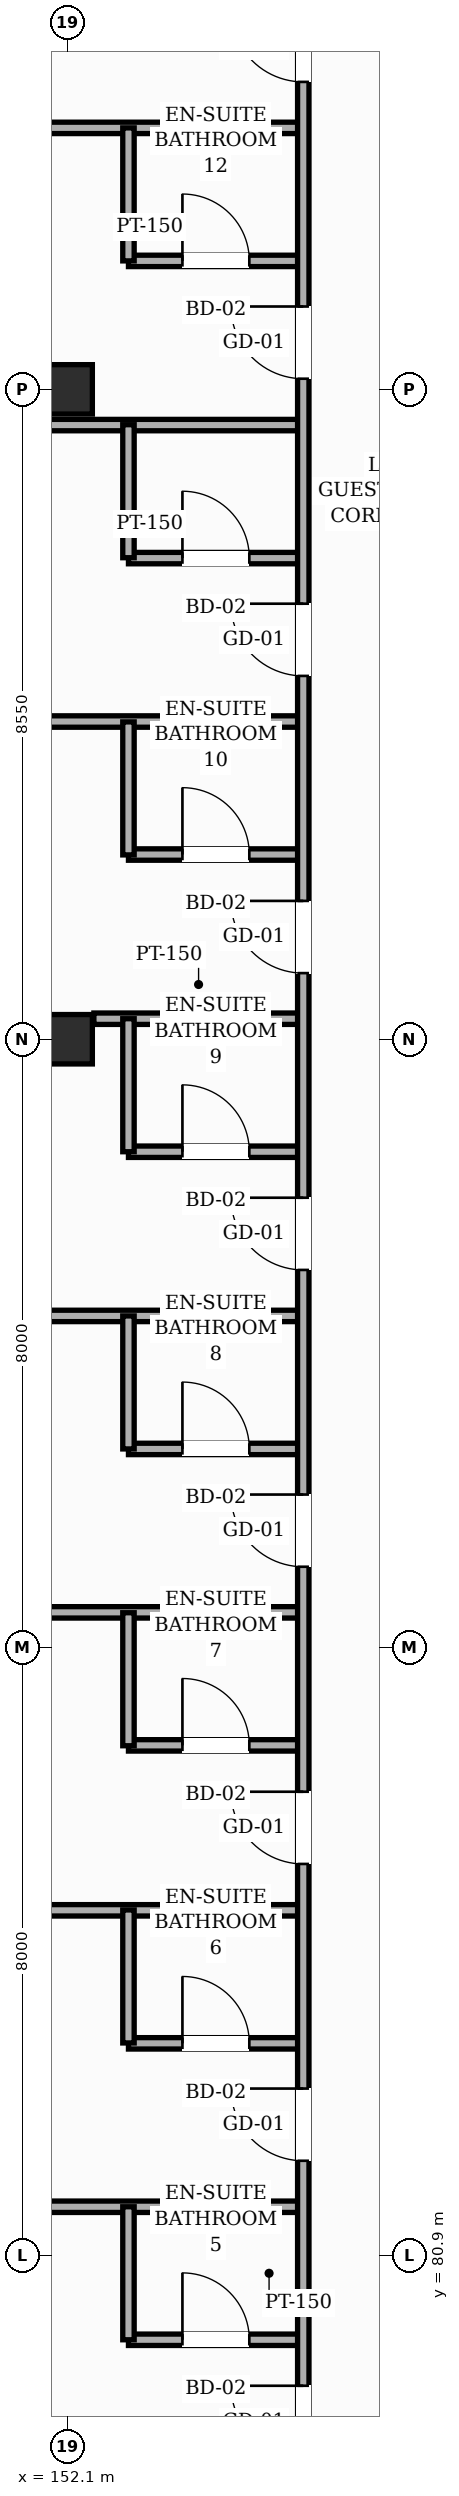
"""IFC4 building model, lengths in metres.
Left out: names, types, materials, properties, quantities, classifications, styles, units other than length and angle.
Written with IfcOpenShell. Run it as: python <this file> out.ifc"""

import sys

from ifc_helpers import new_model, si_unit, direction, frame, frame_2d, origin, origin_2d, place, context, subcontext, project, spatial, rectangle, hollow_rectangle, extrude, element, fill, save


model = new_model("IFC4")
c1 = context("Model", 3, precision=1e-05, world=origin(), true_north=direction((0.0, 1.0)))
c2 = subcontext(c1, "Body", "Model", "MODEL_VIEW")
j1 = project(units=[si_unit("LENGTHUNIT", "METRE"), si_unit("PLANEANGLEUNIT", "RADIAN")], contexts=[c1])
p1 = place(None, origin())
s1 = spatial("IfcSite", under=j1, at=p1, CompositionType="ELEMENT")
p2 = place(p1, origin())
s2 = spatial("IfcBuilding", under=s1, at=p2, CompositionType="ELEMENT")
p3 = place(p2, frame((0.0, 0.0, 15.0)))
s3 = spatial("IfcBuildingStorey", under=s2, at=p3, CompositionType="ELEMENT", Elevation=15.0)
for number, where, z_axis, x_axis in (
    (1, (152.1, 96.9, 0.0), (0.0, 0.0, 1.0), (1.0, 0.0, 0.0)),
    (2, (152.1, 105.45, 0.0), (0.0, 0.0, 1.0), (1.0, 0.0, 0.0)),
):
    element("IfcColumn", number, at=place(p3, frame(where, z_axis=z_axis, x_axis=x_axis)), inside=s3, PredefinedType="COLUMN", context=c2, shape_type="SweptSolid", body=[
        extrude(hollow_rectangle(XDim=0.65, YDim=0.65, WallThickness=0.025, InnerFilletRadius=0.025, OuterFilletRadius=0.05, at=origin_2d()), origin(), (0.0, 0.0, 1.0), 4.8),
    ])
p4 = place(p3, frame((152.9, 79.79, 0.0), z_axis=(0.0, 0.0, 1.0), x_axis=(1.0, 0.0, 0.0)))
e3 = element("IfcWall", 3, at=p4, inside=s3, PredefinedType="PARTITIONING", context=c2, shape_type="SweptSolid", body=[
    extrude(rectangle(XDim=2.3, YDim=0.15, at=frame_2d((1.15, 0.0))), origin(), (0.0, 0.0, 1.0), 4.545),
])
p5 = place(p4, frame((0.71, 0.0, 0.0)))
e4 = element("IfcOpeningElement", 4, at=p5, cuts=e3, PredefinedType="OPENING", context=c2, shape_type="SweptSolid", body=[
    extrude(rectangle(XDim=0.88, YDim=2.12, at=frame_2d((0.44, 1.06))), frame((0.0, 0.085, 0.0), z_axis=(0.0, -1.0, 0.0), x_axis=(1.0, 0.0, 0.0)), (0.0, 0.0, 1.0), 0.17),
])
p6 = place(p3, frame((144.2, 81.54, 0.0), z_axis=(0.0, 0.0, 1.0), x_axis=(1.0, 0.0, 0.0)))
e5 = element("IfcWall", 5, at=p6, inside=s3, PredefinedType="PARTITIONING", context=c2, shape_type="SweptSolid", body=[
    extrude(rectangle(XDim=11.0, YDim=0.15, at=frame_2d((5.5, 0.0))), origin(), (0.0, 0.0, 1.0), 4.545),
])
p7 = place(p3, frame((152.9, 83.69, 0.0), z_axis=(0.0, 0.0, 1.0), x_axis=(1.0, 0.0, 0.0)))
e6 = element("IfcWall", 6, at=p7, inside=s3, PredefinedType="PARTITIONING", context=c2, shape_type="SweptSolid", body=[
    extrude(rectangle(XDim=2.3, YDim=0.15, at=frame_2d((1.15, 0.0))), origin(), (0.0, 0.0, 1.0), 4.545),
])
p8 = place(p7, frame((0.71, 0.0, 0.0)))
e7 = element("IfcOpeningElement", 7, at=p8, cuts=e6, PredefinedType="OPENING", context=c2, shape_type="SweptSolid", body=[
    extrude(rectangle(XDim=0.88, YDim=2.12, at=frame_2d((0.44, 1.06))), frame((0.0, 0.085, 0.0), z_axis=(0.0, -1.0, 0.0), x_axis=(1.0, 0.0, 0.0)), (0.0, 0.0, 1.0), 0.17),
])
p9 = place(p3, frame((144.2, 85.44, 0.0), z_axis=(0.0, 0.0, 1.0), x_axis=(1.0, 0.0, 0.0)))
e8 = element("IfcWall", 8, at=p9, inside=s3, PredefinedType="PARTITIONING", context=c2, shape_type="SweptSolid", body=[
    extrude(rectangle(XDim=11.0, YDim=0.15, at=frame_2d((5.5, 0.0))), origin(), (0.0, 0.0, 1.0), 4.545),
])
p10 = place(p3, frame((152.9, 87.61, 0.0), z_axis=(0.0, 0.0, 1.0), x_axis=(1.0, 0.0, 0.0)))
e9 = element("IfcWall", 9, at=p10, inside=s3, PredefinedType="PARTITIONING", context=c2, shape_type="SweptSolid", body=[
    extrude(rectangle(XDim=2.3, YDim=0.15, at=frame_2d((1.15, 0.0))), origin(), (0.0, 0.0, 1.0), 4.545),
])
p11 = place(p10, frame((0.71, 0.0, 0.0)))
e10 = element("IfcOpeningElement", 10, at=p11, cuts=e9, PredefinedType="OPENING", context=c2, shape_type="SweptSolid", body=[
    extrude(rectangle(XDim=0.88, YDim=2.12, at=frame_2d((0.44, 1.06))), frame((0.0, 0.085, 0.0), z_axis=(0.0, -1.0, 0.0), x_axis=(1.0, 0.0, 0.0)), (0.0, 0.0, 1.0), 0.17),
])
p12 = place(p3, frame((144.2, 89.36, 0.0), z_axis=(0.0, 0.0, 1.0), x_axis=(1.0, 0.0, 0.0)))
e11 = element("IfcWall", 11, at=p12, inside=s3, PredefinedType="PARTITIONING", context=c2, shape_type="SweptSolid", body=[
    extrude(rectangle(XDim=11.0, YDim=0.15, at=frame_2d((5.5, 0.0))), origin(), (0.0, 0.0, 1.0), 3.095),
])
p13 = place(p3, frame((152.9, 91.51, 0.0), z_axis=(0.0, 0.0, 1.0), x_axis=(1.0, 0.0, 0.0)))
e12 = element("IfcWall", 12, at=p13, inside=s3, PredefinedType="PARTITIONING", context=c2, shape_type="SweptSolid", body=[
    extrude(rectangle(XDim=2.3, YDim=0.15, at=frame_2d((1.15, 0.0))), origin(), (0.0, 0.0, 1.0), 4.545),
])
p14 = place(p13, frame((0.71, 0.0, 0.0)))
e13 = element("IfcOpeningElement", 13, at=p14, cuts=e12, PredefinedType="OPENING", context=c2, shape_type="SweptSolid", body=[
    extrude(rectangle(XDim=0.88, YDim=2.12, at=frame_2d((0.44, 1.06))), frame((0.0, 0.085, 0.0), z_axis=(0.0, -1.0, 0.0), x_axis=(1.0, 0.0, 0.0)), (0.0, 0.0, 1.0), 0.17),
])
p15 = place(p3, frame((144.2, 93.26, 0.0), z_axis=(0.0, 0.0, 1.0), x_axis=(1.0, 0.0, 0.0)))
e14 = element("IfcWall", 14, at=p15, inside=s3, PredefinedType="PARTITIONING", context=c2, shape_type="SweptSolid", body=[
    extrude(rectangle(XDim=11.0, YDim=0.15, at=frame_2d((5.5, 0.0))), origin(), (0.0, 0.0, 1.0), 4.545),
])
p16 = place(p3, frame((152.9, 95.42, 0.0), z_axis=(0.0, 0.0, 1.0), x_axis=(1.0, 0.0, 0.0)))
e15 = element("IfcWall", 15, at=p16, inside=s3, PredefinedType="PARTITIONING", context=c2, shape_type="SweptSolid", body=[
    extrude(rectangle(XDim=2.3, YDim=0.15, at=frame_2d((1.15, 0.0))), origin(), (0.0, 0.0, 1.0), 4.545),
])
p17 = place(p16, frame((0.71, 0.0, 0.0)))
e16 = element("IfcOpeningElement", 16, at=p17, cuts=e15, PredefinedType="OPENING", context=c2, shape_type="SweptSolid", body=[
    extrude(rectangle(XDim=0.88, YDim=2.12, at=frame_2d((0.44, 1.06))), frame((0.0, 0.085, 0.0), z_axis=(0.0, -1.0, 0.0), x_axis=(1.0, 0.0, 0.0)), (0.0, 0.0, 1.0), 0.17),
])
p18 = place(p3, frame((152.445, 97.17, 0.0), z_axis=(0.0, 0.0, 1.0), x_axis=(1.0, 0.0, 0.0)))
e17 = element("IfcWall", 17, at=p18, inside=s3, PredefinedType="PARTITIONING", context=c2, shape_type="SweptSolid", body=[
    extrude(rectangle(XDim=2.755, YDim=0.15, at=frame_2d((1.377, 0.0))), origin(), (0.0, 0.0, 1.0), 3.885),
])
p19 = place(p3, frame((152.9, 99.33, 0.0), z_axis=(0.0, 0.0, 1.0), x_axis=(1.0, 0.0, 0.0)))
e18 = element("IfcWall", 18, at=p19, inside=s3, PredefinedType="PARTITIONING", context=c2, shape_type="SweptSolid", body=[
    extrude(rectangle(XDim=2.3, YDim=0.15, at=frame_2d((1.15, 0.0))), origin(), (0.0, 0.0, 1.0), 4.545),
])
p20 = place(p19, frame((0.71, 0.0, 0.0)))
e19 = element("IfcOpeningElement", 19, at=p20, cuts=e18, PredefinedType="OPENING", context=c2, shape_type="SweptSolid", body=[
    extrude(rectangle(XDim=0.88, YDim=2.12, at=frame_2d((0.44, 1.06))), frame((0.0, 0.085, 0.0), z_axis=(0.0, -1.0, 0.0), x_axis=(1.0, 0.0, 0.0)), (0.0, 0.0, 1.0), 0.17),
])
p21 = place(p3, frame((144.2, 101.08, 0.0), z_axis=(0.0, 0.0, 1.0), x_axis=(1.0, 0.0, 0.0)))
e20 = element("IfcWall", 20, at=p21, inside=s3, PredefinedType="PARTITIONING", context=c2, shape_type="SweptSolid", body=[
    extrude(rectangle(XDim=11.0, YDim=0.15, at=frame_2d((5.5, 0.0))), origin(), (0.0, 0.0, 1.0), 4.185),
])
p22 = place(p3, frame((152.9, 103.23, 0.0), z_axis=(0.0, 0.0, 1.0), x_axis=(1.0, 0.0, 0.0)))
e21 = element("IfcWall", 21, at=p22, inside=s3, PredefinedType="PARTITIONING", context=c2, shape_type="SweptSolid", body=[
    extrude(rectangle(XDim=2.3, YDim=0.15, at=frame_2d((1.15, 0.0))), origin(), (0.0, 0.0, 1.0), 4.545),
])
p23 = place(p22, frame((0.71, 0.0, 0.0)))
e22 = element("IfcOpeningElement", 22, at=p23, cuts=e21, PredefinedType="OPENING", context=c2, shape_type="SweptSolid", body=[
    extrude(rectangle(XDim=0.88, YDim=2.12, at=frame_2d((0.44, 1.06))), frame((0.0, 0.085, 0.0), z_axis=(0.0, -1.0, 0.0), x_axis=(1.0, 0.0, 0.0)), (0.0, 0.0, 1.0), 0.17),
])
p24 = place(p3, frame((144.2, 104.98, 0.0), z_axis=(0.0, 0.0, 1.0), x_axis=(1.0, 0.0, 0.0)))
e23 = element("IfcWall", 23, at=p24, inside=s3, PredefinedType="PARTITIONING", context=c2, shape_type="SweptSolid", body=[
    extrude(rectangle(XDim=11.0, YDim=0.15, at=frame_2d((5.5, 0.0))), origin(), (0.0, 0.0, 1.0), 4.545),
])
p25 = place(p3, frame((152.9, 107.14, 0.0), z_axis=(0.0, 0.0, 1.0), x_axis=(1.0, 0.0, 0.0)))
e24 = element("IfcWall", 24, at=p25, inside=s3, PredefinedType="PARTITIONING", context=c2, shape_type="SweptSolid", body=[
    extrude(rectangle(XDim=2.3, YDim=0.15, at=frame_2d((1.15, 0.0))), origin(), (0.0, 0.0, 1.0), 4.545),
])
p26 = place(p25, frame((0.71, 0.0, 0.0)))
e25 = element("IfcOpeningElement", 25, at=p26, cuts=e24, PredefinedType="OPENING", context=c2, shape_type="SweptSolid", body=[
    extrude(rectangle(XDim=0.88, YDim=2.12, at=frame_2d((0.44, 1.06))), frame((0.0, 0.085, 0.0), z_axis=(0.0, -1.0, 0.0), x_axis=(1.0, 0.0, 0.0)), (0.0, 0.0, 1.0), 0.17),
])
p27 = place(p3, frame((144.2, 108.89, 0.0), z_axis=(0.0, 0.0, 1.0), x_axis=(1.0, 0.0, 0.0)))
e26 = element("IfcWall", 26, at=p27, inside=s3, PredefinedType="PARTITIONING", context=c2, shape_type="SweptSolid", body=[
    extrude(rectangle(XDim=11.0, YDim=0.15, at=frame_2d((5.5, 0.0))), origin(), (0.0, 0.0, 1.0), 4.545),
])
for number, where, z_axis, x_axis in (
    (27, (152.9, 79.79, 0.0), (0.0, 0.0, 1.0), (0.0, 1.0, 0.0)),
    (28, (152.9, 83.695, 0.0), (0.0, 0.0, 1.0), (0.0, 1.0, 0.0)),
    (29, (152.9, 87.605, 0.0), (0.0, 0.0, 1.0), (0.0, 1.0, 0.0)),
    (30, (152.9, 91.51, 0.0), (0.0, 0.0, 1.0), (0.0, 1.0, 0.0)),
    (31, (152.9, 95.42, 0.0), (0.0, 0.0, 1.0), (0.0, 1.0, 0.0)),
    (32, (152.9, 99.325, 0.0), (0.0, 0.0, 1.0), (0.0, 1.0, 0.0)),
    (33, (152.9, 103.235, 0.0), (0.0, 0.0, 1.0), (0.0, 1.0, 0.0)),
    (34, (152.9, 107.14, 0.0), (0.0, 0.0, 1.0), (0.0, 1.0, 0.0)),
):
    element("IfcWall", number, at=place(p3, frame(where, z_axis=z_axis, x_axis=x_axis)), inside=s3, PredefinedType="PARTITIONING", context=c2, shape_type="SweptSolid", body=[
        extrude(rectangle(XDim=1.75, YDim=0.15, at=frame_2d((0.875, 0.0))), origin(), (0.0, 0.0, 1.0), 4.545),
    ])
p28 = place(p3, frame((155.2, 62.0, 0.0), z_axis=(0.0, 0.0, 1.0), x_axis=(0.0, 1.0, 0.0)))
e35 = element("IfcWall", 35, at=p28, inside=s3, PredefinedType="PARTITIONING", context=c2, shape_type="SweptSolid", body=[
    extrude(rectangle(XDim=50.8, YDim=0.15, at=frame_2d((25.4, 0.0))), origin(), (0.0, 0.0, 1.0), 4.545),
])
p29 = place(p28, frame((0.53, 0.0, 0.0)))
e36 = element("IfcOpeningElement", 36, at=p29, cuts=e35, PredefinedType="OPENING", context=c2, shape_type="SweptSolid", body=[
    extrude(rectangle(XDim=1.1, YDim=2.2, at=frame_2d((0.55, 1.1))), frame((0.0, 0.085, 0.0), z_axis=(0.0, -1.0, 0.0), x_axis=(1.0, 0.0, 0.0)), (0.0, 0.0, 1.0), 0.17),
])
p30 = place(p28, frame((4.51, 0.0, 0.0)))
e37 = element("IfcOpeningElement", 37, at=p30, cuts=e35, PredefinedType="OPENING", context=c2, shape_type="SweptSolid", body=[
    extrude(rectangle(XDim=0.95, YDim=2.15, at=frame_2d((0.475, 1.075))), frame((0.0, 0.085, 0.0), z_axis=(0.0, -1.0, 0.0), x_axis=(1.0, 0.0, 0.0)), (0.0, 0.0, 1.0), 0.17),
])
p31 = place(p28, frame((8.42, 0.0, 0.0)))
e38 = element("IfcOpeningElement", 38, at=p31, cuts=e35, PredefinedType="OPENING", context=c2, shape_type="SweptSolid", body=[
    extrude(rectangle(XDim=0.95, YDim=2.15, at=frame_2d((0.475, 1.075))), frame((0.0, 0.085, 0.0), z_axis=(0.0, -1.0, 0.0), x_axis=(1.0, 0.0, 0.0)), (0.0, 0.0, 1.0), 0.17),
])
p32 = place(p28, frame((12.33, 0.0, 0.0)))
e39 = element("IfcOpeningElement", 39, at=p32, cuts=e35, PredefinedType="OPENING", context=c2, shape_type="SweptSolid", body=[
    extrude(rectangle(XDim=0.95, YDim=2.15, at=frame_2d((0.475, 1.075))), frame((0.0, 0.085, 0.0), z_axis=(0.0, -1.0, 0.0), x_axis=(1.0, 0.0, 0.0)), (0.0, 0.0, 1.0), 0.17),
])
p33 = place(p28, frame((16.235, 0.0, 0.0)))
e40 = element("IfcOpeningElement", 40, at=p33, cuts=e35, PredefinedType="OPENING", context=c2, shape_type="SweptSolid", body=[
    extrude(rectangle(XDim=0.95, YDim=2.15, at=frame_2d((0.475, 1.075))), frame((0.0, 0.085, 0.0), z_axis=(0.0, -1.0, 0.0), x_axis=(1.0, 0.0, 0.0)), (0.0, 0.0, 1.0), 0.17),
])
p34 = place(p28, frame((20.145, 0.0, 0.0)))
e41 = element("IfcOpeningElement", 41, at=p34, cuts=e35, PredefinedType="OPENING", context=c2, shape_type="SweptSolid", body=[
    extrude(rectangle(XDim=0.95, YDim=2.15, at=frame_2d((0.475, 1.075))), frame((0.0, 0.085, 0.0), z_axis=(0.0, -1.0, 0.0), x_axis=(1.0, 0.0, 0.0)), (0.0, 0.0, 1.0), 0.17),
])
p35 = place(p28, frame((24.05, 0.0, 0.0)))
e42 = element("IfcOpeningElement", 42, at=p35, cuts=e35, PredefinedType="OPENING", context=c2, shape_type="SweptSolid", body=[
    extrude(rectangle(XDim=0.95, YDim=2.15, at=frame_2d((0.475, 1.075))), frame((0.0, 0.085, 0.0), z_axis=(0.0, -1.0, 0.0), x_axis=(1.0, 0.0, 0.0)), (0.0, 0.0, 1.0), 0.17),
])
p36 = place(p28, frame((27.96, 0.0, 0.0)))
e43 = element("IfcOpeningElement", 43, at=p36, cuts=e35, PredefinedType="OPENING", context=c2, shape_type="SweptSolid", body=[
    extrude(rectangle(XDim=0.95, YDim=2.15, at=frame_2d((0.475, 1.075))), frame((0.0, 0.085, 0.0), z_axis=(0.0, -1.0, 0.0), x_axis=(1.0, 0.0, 0.0)), (0.0, 0.0, 1.0), 0.17),
])
p37 = place(p28, frame((31.865, 0.0, 0.0)))
e44 = element("IfcOpeningElement", 44, at=p37, cuts=e35, PredefinedType="OPENING", context=c2, shape_type="SweptSolid", body=[
    extrude(rectangle(XDim=0.95, YDim=2.15, at=frame_2d((0.475, 1.075))), frame((0.0, 0.085, 0.0), z_axis=(0.0, -1.0, 0.0), x_axis=(1.0, 0.0, 0.0)), (0.0, 0.0, 1.0), 0.17),
])
p38 = place(p28, frame((35.77, 0.0, 0.0)))
e45 = element("IfcOpeningElement", 45, at=p38, cuts=e35, PredefinedType="OPENING", context=c2, shape_type="SweptSolid", body=[
    extrude(rectangle(XDim=0.95, YDim=2.15, at=frame_2d((0.475, 1.075))), frame((0.0, 0.085, 0.0), z_axis=(0.0, -1.0, 0.0), x_axis=(1.0, 0.0, 0.0)), (0.0, 0.0, 1.0), 0.17),
])
p39 = place(p28, frame((39.68, 0.0, 0.0)))
e46 = element("IfcOpeningElement", 46, at=p39, cuts=e35, PredefinedType="OPENING", context=c2, shape_type="SweptSolid", body=[
    extrude(rectangle(XDim=0.95, YDim=2.15, at=frame_2d((0.475, 1.075))), frame((0.0, 0.085, 0.0), z_axis=(0.0, -1.0, 0.0), x_axis=(1.0, 0.0, 0.0)), (0.0, 0.0, 1.0), 0.17),
])
p40 = place(p28, frame((43.59, 0.0, 0.0)))
e47 = element("IfcOpeningElement", 47, at=p40, cuts=e35, PredefinedType="OPENING", context=c2, shape_type="SweptSolid", body=[
    extrude(rectangle(XDim=0.95, YDim=2.15, at=frame_2d((0.475, 1.075))), frame((0.0, 0.085, 0.0), z_axis=(0.0, -1.0, 0.0), x_axis=(1.0, 0.0, 0.0)), (0.0, 0.0, 1.0), 0.17),
])
p41 = place(p28, frame((47.495, 0.0, 0.0)))
e48 = element("IfcOpeningElement", 48, at=p41, cuts=e35, PredefinedType="OPENING", context=c2, shape_type="SweptSolid", body=[
    extrude(rectangle(XDim=0.95, YDim=2.15, at=frame_2d((0.475, 1.075))), frame((0.0, 0.085, 0.0), z_axis=(0.0, -1.0, 0.0), x_axis=(1.0, 0.0, 0.0)), (0.0, 0.0, 1.0), 0.17),
])
p42 = place(p33, origin())
e49 = element("IfcDoor", 49, at=p42, inside=s3, OperationType="SINGLE_SWING_RIGHT", PredefinedType="DOOR", context=c2, shape_type="SweptSolid", body=[
    extrude(rectangle(XDim=0.95, YDim=2.15, at=frame_2d((0.475, 1.075))), frame((0.0, 0.025, 0.0), z_axis=(0.0, -1.0, 0.0), x_axis=(1.0, 0.0, 0.0)), (0.0, 0.0, 1.0), 0.05),
])
fill(e40, e49)
p43 = place(p5, origin())
e50 = element("IfcDoor", 50, at=p43, inside=s3, OperationType="SINGLE_SWING_LEFT", PredefinedType="DOOR", context=c2, shape_type="SweptSolid", body=[
    extrude(rectangle(XDim=0.88, YDim=2.12, at=frame_2d((0.44, 1.06))), frame((0.0, 0.025, 0.0), z_axis=(0.0, -1.0, 0.0), x_axis=(1.0, 0.0, 0.0)), (0.0, 0.0, 1.0), 0.05),
])
fill(e4, e50)
p44 = place(p34, origin())
e51 = element("IfcDoor", 51, at=p44, inside=s3, OperationType="SINGLE_SWING_RIGHT", PredefinedType="DOOR", context=c2, shape_type="SweptSolid", body=[
    extrude(rectangle(XDim=0.95, YDim=2.15, at=frame_2d((0.475, 1.075))), frame((0.0, 0.025, 0.0), z_axis=(0.0, -1.0, 0.0), x_axis=(1.0, 0.0, 0.0)), (0.0, 0.0, 1.0), 0.05),
])
fill(e41, e51)
p45 = place(p8, origin())
e52 = element("IfcDoor", 52, at=p45, inside=s3, OperationType="SINGLE_SWING_LEFT", PredefinedType="DOOR", context=c2, shape_type="SweptSolid", body=[
    extrude(rectangle(XDim=0.88, YDim=2.12, at=frame_2d((0.44, 1.06))), frame((0.0, 0.025, 0.0), z_axis=(0.0, -1.0, 0.0), x_axis=(1.0, 0.0, 0.0)), (0.0, 0.0, 1.0), 0.05),
])
fill(e7, e52)
p46 = place(p35, origin())
e53 = element("IfcDoor", 53, at=p46, inside=s3, OperationType="SINGLE_SWING_RIGHT", PredefinedType="DOOR", context=c2, shape_type="SweptSolid", body=[
    extrude(rectangle(XDim=0.95, YDim=2.15, at=frame_2d((0.475, 1.075))), frame((0.0, 0.025, 0.0), z_axis=(0.0, -1.0, 0.0), x_axis=(1.0, 0.0, 0.0)), (0.0, 0.0, 1.0), 0.05),
])
fill(e42, e53)
p47 = place(p11, origin())
e54 = element("IfcDoor", 54, at=p47, inside=s3, OperationType="SINGLE_SWING_LEFT", PredefinedType="DOOR", context=c2, shape_type="SweptSolid", body=[
    extrude(rectangle(XDim=0.88, YDim=2.12, at=frame_2d((0.44, 1.06))), frame((0.0, 0.025, 0.0), z_axis=(0.0, -1.0, 0.0), x_axis=(1.0, 0.0, 0.0)), (0.0, 0.0, 1.0), 0.05),
])
fill(e10, e54)
p48 = place(p36, origin())
e55 = element("IfcDoor", 55, at=p48, inside=s3, OperationType="SINGLE_SWING_RIGHT", PredefinedType="DOOR", context=c2, shape_type="SweptSolid", body=[
    extrude(rectangle(XDim=0.95, YDim=2.15, at=frame_2d((0.475, 1.075))), frame((0.0, 0.025, 0.0), z_axis=(0.0, -1.0, 0.0), x_axis=(1.0, 0.0, 0.0)), (0.0, 0.0, 1.0), 0.05),
])
fill(e43, e55)
p49 = place(p14, origin())
e56 = element("IfcDoor", 56, at=p49, inside=s3, OperationType="SINGLE_SWING_LEFT", PredefinedType="DOOR", context=c2, shape_type="SweptSolid", body=[
    extrude(rectangle(XDim=0.88, YDim=2.12, at=frame_2d((0.44, 1.06))), frame((0.0, 0.025, 0.0), z_axis=(0.0, -1.0, 0.0), x_axis=(1.0, 0.0, 0.0)), (0.0, 0.0, 1.0), 0.05),
])
fill(e13, e56)
p50 = place(p37, origin())
e57 = element("IfcDoor", 57, at=p50, inside=s3, OperationType="SINGLE_SWING_RIGHT", PredefinedType="DOOR", context=c2, shape_type="SweptSolid", body=[
    extrude(rectangle(XDim=0.95, YDim=2.15, at=frame_2d((0.475, 1.075))), frame((0.0, 0.025, 0.0), z_axis=(0.0, -1.0, 0.0), x_axis=(1.0, 0.0, 0.0)), (0.0, 0.0, 1.0), 0.05),
])
fill(e44, e57)
p51 = place(p17, origin())
e58 = element("IfcDoor", 58, at=p51, inside=s3, OperationType="SINGLE_SWING_LEFT", PredefinedType="DOOR", context=c2, shape_type="SweptSolid", body=[
    extrude(rectangle(XDim=0.88, YDim=2.12, at=frame_2d((0.44, 1.06))), frame((0.0, 0.025, 0.0), z_axis=(0.0, -1.0, 0.0), x_axis=(1.0, 0.0, 0.0)), (0.0, 0.0, 1.0), 0.05),
])
fill(e16, e58)
p52 = place(p38, origin())
e59 = element("IfcDoor", 59, at=p52, inside=s3, OperationType="SINGLE_SWING_RIGHT", PredefinedType="DOOR", context=c2, shape_type="SweptSolid", body=[
    extrude(rectangle(XDim=0.95, YDim=2.15, at=frame_2d((0.475, 1.075))), frame((0.0, 0.025, 0.0), z_axis=(0.0, -1.0, 0.0), x_axis=(1.0, 0.0, 0.0)), (0.0, 0.0, 1.0), 0.05),
])
fill(e45, e59)
p53 = place(p20, origin())
e60 = element("IfcDoor", 60, at=p53, inside=s3, OperationType="SINGLE_SWING_LEFT", PredefinedType="DOOR", context=c2, shape_type="SweptSolid", body=[
    extrude(rectangle(XDim=0.88, YDim=2.12, at=frame_2d((0.44, 1.06))), frame((0.0, 0.025, 0.0), z_axis=(0.0, -1.0, 0.0), x_axis=(1.0, 0.0, 0.0)), (0.0, 0.0, 1.0), 0.05),
])
fill(e19, e60)
p54 = place(p39, origin())
e61 = element("IfcDoor", 61, at=p54, inside=s3, OperationType="SINGLE_SWING_RIGHT", PredefinedType="DOOR", context=c2, shape_type="SweptSolid", body=[
    extrude(rectangle(XDim=0.95, YDim=2.15, at=frame_2d((0.475, 1.075))), frame((0.0, 0.025, 0.0), z_axis=(0.0, -1.0, 0.0), x_axis=(1.0, 0.0, 0.0)), (0.0, 0.0, 1.0), 0.05),
])
fill(e46, e61)
p55 = place(p23, origin())
e62 = element("IfcDoor", 62, at=p55, inside=s3, OperationType="SINGLE_SWING_LEFT", PredefinedType="DOOR", context=c2, shape_type="SweptSolid", body=[
    extrude(rectangle(XDim=0.88, YDim=2.12, at=frame_2d((0.44, 1.06))), frame((0.0, 0.025, 0.0), z_axis=(0.0, -1.0, 0.0), x_axis=(1.0, 0.0, 0.0)), (0.0, 0.0, 1.0), 0.05),
])
fill(e22, e62)
p56 = place(p40, origin())
e63 = element("IfcDoor", 63, at=p56, inside=s3, OperationType="SINGLE_SWING_RIGHT", PredefinedType="DOOR", context=c2, shape_type="SweptSolid", body=[
    extrude(rectangle(XDim=0.95, YDim=2.15, at=frame_2d((0.475, 1.075))), frame((0.0, 0.025, 0.0), z_axis=(0.0, -1.0, 0.0), x_axis=(1.0, 0.0, 0.0)), (0.0, 0.0, 1.0), 0.05),
])
fill(e47, e63)
p57 = place(p26, origin())
e64 = element("IfcDoor", 64, at=p57, inside=s3, OperationType="SINGLE_SWING_LEFT", PredefinedType="DOOR", context=c2, shape_type="SweptSolid", body=[
    extrude(rectangle(XDim=0.88, YDim=2.12, at=frame_2d((0.44, 1.06))), frame((0.0, 0.025, 0.0), z_axis=(0.0, -1.0, 0.0), x_axis=(1.0, 0.0, 0.0)), (0.0, 0.0, 1.0), 0.05),
])
fill(e25, e64)
p58 = place(p41, origin())
e65 = element("IfcDoor", 65, at=p58, inside=s3, OperationType="SINGLE_SWING_RIGHT", PredefinedType="DOOR", context=c2, shape_type="SweptSolid", body=[
    extrude(rectangle(XDim=0.95, YDim=2.15, at=frame_2d((0.475, 1.075))), frame((0.0, 0.025, 0.0), z_axis=(0.0, -1.0, 0.0), x_axis=(1.0, 0.0, 0.0)), (0.0, 0.0, 1.0), 0.05),
])
fill(e48, e65)
save(model, sys.argv[1])
